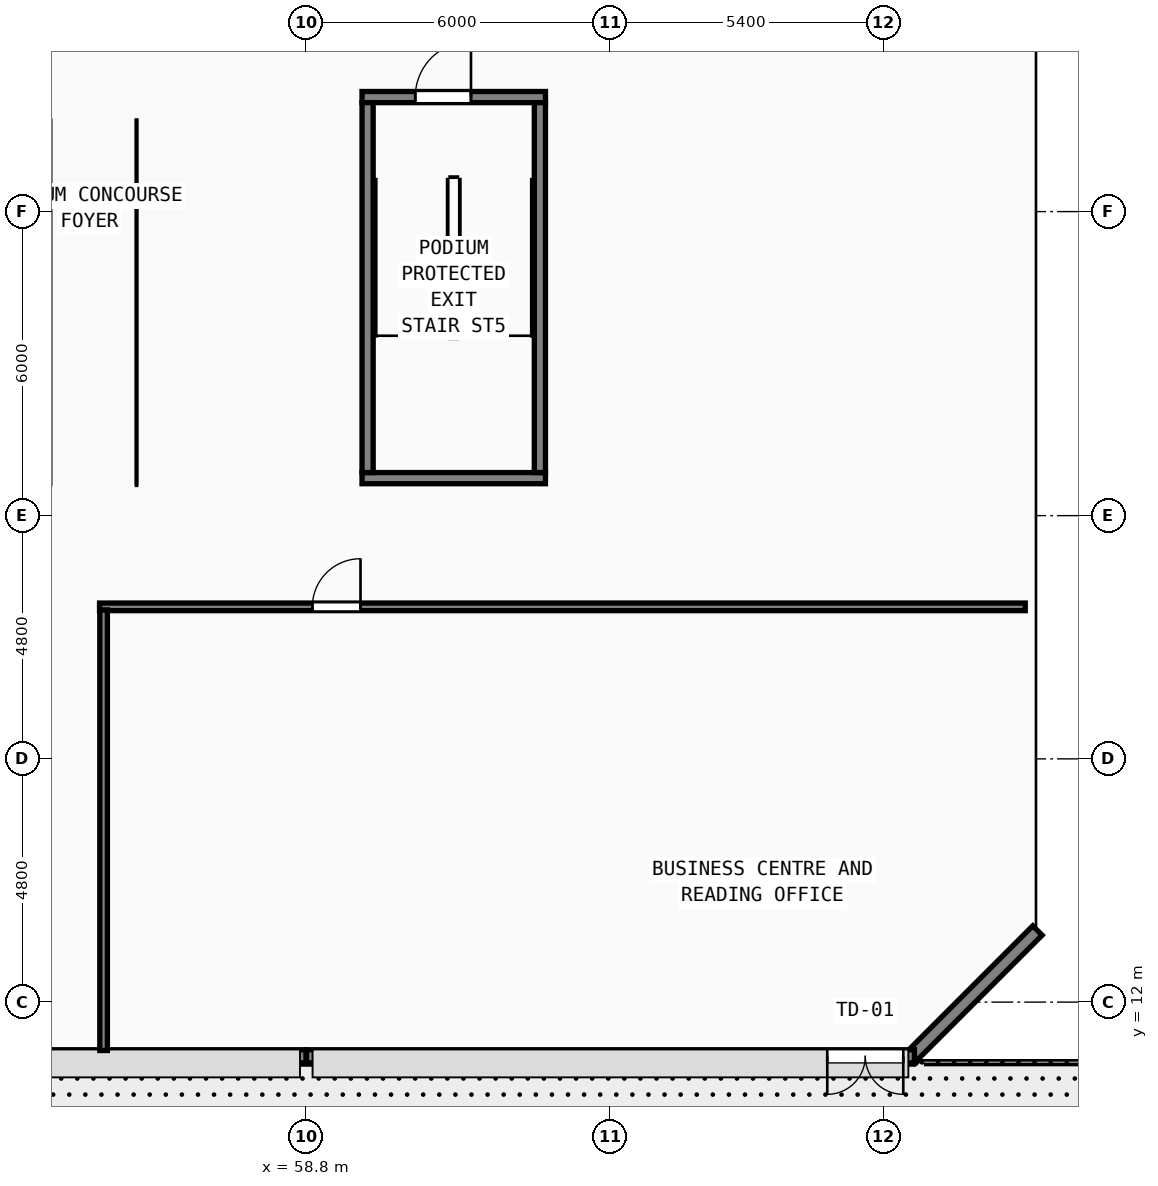
"""IFC4 building model, lengths in metres.
Left out: names, types, materials, properties, quantities, classifications, styles, units other than length and angle.
Written with IfcOpenShell. Run it as: python <this file> out.ifc"""

import sys

from ifc_helpers import new_model, si_unit, direction, frame, frame_2d, origin, origin_2d, place, context, subcontext, project, spatial, rectangle, hollow_rectangle, i_section, extrude, element, fill, save


model = new_model("IFC4")
c1 = context("Model", 3, precision=1e-05, world=origin(), true_north=direction((0.0, 1.0)))
c2 = subcontext(c1, "Body", "Model", "MODEL_VIEW")
j1 = project(units=[si_unit("LENGTHUNIT", "METRE"), si_unit("PLANEANGLEUNIT", "RADIAN")], contexts=[c1])
p1 = place(None, origin())
s1 = spatial("IfcSite", under=j1, at=p1, CompositionType="ELEMENT")
p2 = place(p1, origin())
s2 = spatial("IfcBuilding", under=s1, at=p2, CompositionType="ELEMENT")
p3 = place(p2, frame((0.0, 0.0, 15.6)))
s3 = spatial("IfcBuildingStorey", under=s2, at=p3, CompositionType="ELEMENT", Elevation=15.6)
p4 = place(p3, frame((59.9, 29.86, 0.0), z_axis=(0.0, 0.0, 1.0), x_axis=(1.0, 0.0, 0.0)))
e1 = element("IfcWall", 1, at=p4, inside=s3, PredefinedType="SHEAR", context=c2, shape_type="SweptSolid", body=[
    extrude(rectangle(XDim=3.62, YDim=0.22, at=frame_2d((1.81, 0.0))), origin(), (0.0, 0.0, 1.0), 3.78),
])
p5 = place(p4, frame((1.05, 0.0, 0.0)))
e2 = element("IfcOpeningElement", 2, at=p5, cuts=e1, PredefinedType="OPENING", context=c2, shape_type="SweptSolid", body=[
    extrude(rectangle(XDim=1.1, YDim=2.15, at=frame_2d((0.55, 1.075))), frame((0.0, 0.12, 0.0), z_axis=(0.0, -1.0, 0.0), x_axis=(1.0, 0.0, 0.0)), (0.0, 0.0, 1.0), 0.24),
])
p6 = place(p3, frame((59.9, 22.34, 0.0), z_axis=(0.0, 0.0, 1.0), x_axis=(1.0, 0.0, 0.0)))
e3 = element("IfcWall", 3, at=p6, inside=s3, PredefinedType="SHEAR", context=c2, shape_type="SweptSolid", body=[
    extrude(rectangle(XDim=3.62, YDim=0.22, at=frame_2d((1.81, 0.0))), origin(), (0.0, 0.0, 1.0), 3.78),
])
for number, where, z_axis, x_axis in (
    (4, (60.01, 22.45, 0.0), (0.0, 0.0, 1.0), (0.0, 1.0, 0.0)),
    (5, (63.41, 22.45, 0.0), (0.0, 0.0, 1.0), (0.0, 1.0, 0.0)),
):
    element("IfcWall", number, at=place(p3, frame(where, z_axis=z_axis, x_axis=x_axis)), inside=s3, PredefinedType="SHEAR", context=c2, shape_type="SweptSolid", body=[
        extrude(rectangle(XDim=7.3, YDim=0.22, at=frame_2d((3.65, 0.0))), origin(), (0.0, 0.0, 1.0), 3.78),
    ])
for number, where, z_axis, x_axis in (
    (6, (64.2, 16.8, 0.0), (0.0, 0.0, 1.0), (1.0, 0.0, 0.0)),
    (7, (64.2, 27.6, 0.0), (0.0, 0.0, 1.0), (1.0, 0.0, 0.0)),
):
    element("IfcColumn", number, at=place(p3, frame(where, z_axis=z_axis, x_axis=x_axis)), inside=s3, PredefinedType="COLUMN", context=c2, shape_type="SweptSolid", body=[
        extrude(hollow_rectangle(XDim=1.3, YDim=1.3, WallThickness=0.048, at=origin_2d()), origin(), (0.0, 0.0, 1.0), 4.2),
    ])
for number, where, z_axis, x_axis in (
    (8, (70.8, 17.4, 0.0), (0.0, 0.0, 1.0), (1.0, 0.0, 0.0)),
    (9, (70.8, 27.6, 0.0), (0.0, 0.0, 1.0), (1.0, 0.0, 0.0)),
):
    element("IfcColumn", number, at=place(p3, frame(where, z_axis=z_axis, x_axis=x_axis)), inside=s3, PredefinedType="COLUMN", context=c2, shape_type="SweptSolid", body=[
        extrude(hollow_rectangle(XDim=1.15, YDim=1.15, WallThickness=0.042, at=origin_2d()), origin(), (0.0, 0.0, 1.0), 4.2),
    ])
for number, where, z_axis, x_axis in (
    (10, (58.8, 11.0, 0.0), (0.0, 0.0, 1.0), (1.0, 0.0, 0.0)),
    (11, (58.8, 13.2, 0.0), (0.0, 0.0, 1.0), (1.0, 0.0, 0.0)),
    (12, (58.8, 16.8, 0.0), (0.0, 0.0, 1.0), (1.0, 0.0, 0.0)),
):
    element("IfcColumn", number, at=place(p3, frame(where, z_axis=z_axis, x_axis=x_axis)), inside=s3, PredefinedType="COLUMN", context=c2, shape_type="SweptSolid", body=[
        extrude(i_section(OverallWidth=0.3, OverallDepth=0.3, WebThickness=0.01, FlangeThickness=0.015, FilletRadius=0.018, at=origin_2d()), origin(), (0.0, 0.0, 1.0), 4.2),
    ])
p7 = place(p3, frame((70.707, 10.891, 0.0), z_axis=(0.0, 0.0, 1.0), x_axis=(0.707106781187, 0.707106781187, 0.0)))
e13 = element("IfcWall", 13, at=p7, inside=s3, PredefinedType="SOLIDWALL", context=c2, shape_type="SweptSolid", body=[
    extrude(rectangle(XDim=3.566, YDim=0.26, at=frame_2d((1.783, 0.0))), origin(), (0.0, 0.0, 1.0), 3.78),
])
p8 = place(p3, frame((18.004, 10.93, 0.0), z_axis=(0.0, 0.0, 1.0), x_axis=(1.0, 0.0, 0.0)))
e14 = element("IfcWall", 14, at=p8, inside=s3, PredefinedType="SOLIDWALL", context=c2, shape_type="SweptSolid", body=[
    extrude(rectangle(XDim=40.792, YDim=0.26, at=frame_2d((20.396, 0.0))), origin(), (0.0, 0.0, 1.0), 3.177),
])
p9 = place(p3, frame((58.804, 10.93, 0.0), z_axis=(0.0, 0.0, 1.0), x_axis=(1.0, 0.0, 0.0)))
e15 = element("IfcWall", 15, at=p9, inside=s3, PredefinedType="SOLIDWALL", context=c2, shape_type="SweptSolid", body=[
    extrude(rectangle(XDim=11.997, YDim=0.26, at=frame_2d((5.999, 0.0))), origin(), (0.0, 0.0, 1.0), 3.78),
])
p10 = place(p9, frame((11.777, 0.0, 0.0), z_axis=(0.0, 0.0, 1.0), x_axis=(-1.0, 0.0, 0.0)))
e16 = element("IfcOpeningElement", 16, at=p10, cuts=e15, PredefinedType="OPENING", context=c2, shape_type="SweptSolid", body=[
    extrude(rectangle(XDim=1.5, YDim=2.2, at=frame_2d((0.75, 1.1))), frame((0.0, 0.14, 0.0), z_axis=(0.0, -1.0, 0.0), x_axis=(1.0, 0.0, 0.0)), (0.0, 0.0, 1.0), 0.28),
])
p11 = place(p3, frame((54.72, 19.8, 0.0), z_axis=(0.0, 0.0, 1.0), x_axis=(1.0, 0.0, 0.0)))
e17 = element("IfcWall", 17, at=p11, inside=s3, PredefinedType="PARTITIONING", context=c2, shape_type="SweptSolid", body=[
    extrude(rectangle(XDim=18.268, YDim=0.15, at=frame_2d((9.134, 0.0))), origin(), (0.0, 0.0, 1.0), 3.78),
])
p12 = place(p11, frame((5.15, 0.0, 0.0), z_axis=(0.0, 0.0, 1.0), x_axis=(-1.0, 0.0, 0.0)))
e18 = element("IfcOpeningElement", 18, at=p12, cuts=e17, PredefinedType="OPENING", context=c2, shape_type="SweptSolid", body=[
    extrude(rectangle(XDim=0.95, YDim=2.12, at=frame_2d((0.475, 1.06))), frame((0.0, 0.085, 0.0), z_axis=(0.0, -1.0, 0.0), x_axis=(1.0, 0.0, 0.0)), (0.0, 0.0, 1.0), 0.17),
])
p13 = place(p3, frame((54.8, 11.045, 0.0), z_axis=(0.0, 0.0, 1.0), x_axis=(0.0, 1.0, 0.0)))
e19 = element("IfcWall", 19, at=p13, inside=s3, PredefinedType="PARTITIONING", context=c2, shape_type="SweptSolid", body=[
    extrude(rectangle(XDim=8.695, YDim=0.15, at=frame_2d((4.348, 0.0))), origin(), (0.0, 0.0, 1.0), 3.78),
])
p14 = place(p10, origin())
e20 = element("IfcDoor", 20, at=p14, inside=s3, OperationType="DOUBLE_DOOR_SINGLE_SWING", PredefinedType="DOOR", context=c2, shape_type="SweptSolid", body=[
    extrude(rectangle(XDim=1.5, YDim=2.2, at=frame_2d((0.75, 1.1))), frame((0.0, 0.025, 0.0), z_axis=(0.0, -1.0, 0.0), x_axis=(1.0, 0.0, 0.0)), (0.0, 0.0, 1.0), 0.05),
])
fill(e16, e20)
p15 = place(p5, origin())
e21 = element("IfcDoor", 21, at=p15, inside=s3, OperationType="SINGLE_SWING_RIGHT", PredefinedType="DOOR", context=c2, shape_type="SweptSolid", body=[
    extrude(rectangle(XDim=1.1, YDim=2.15, at=frame_2d((0.55, 1.075))), frame((0.0, 0.025, 0.0), z_axis=(0.0, -1.0, 0.0), x_axis=(1.0, 0.0, 0.0)), (0.0, 0.0, 1.0), 0.05),
])
fill(e2, e21)
p16 = place(p12, origin())
e22 = element("IfcDoor", 22, at=p16, inside=s3, OperationType="SINGLE_SWING_LEFT", PredefinedType="DOOR", context=c2, shape_type="SweptSolid", body=[
    extrude(rectangle(XDim=0.95, YDim=2.12, at=frame_2d((0.475, 1.06))), frame((0.0, 0.025, 0.0), z_axis=(0.0, -1.0, 0.0), x_axis=(1.0, 0.0, 0.0)), (0.0, 0.0, 1.0), 0.05),
])
fill(e18, e22)
save(model, sys.argv[1])
